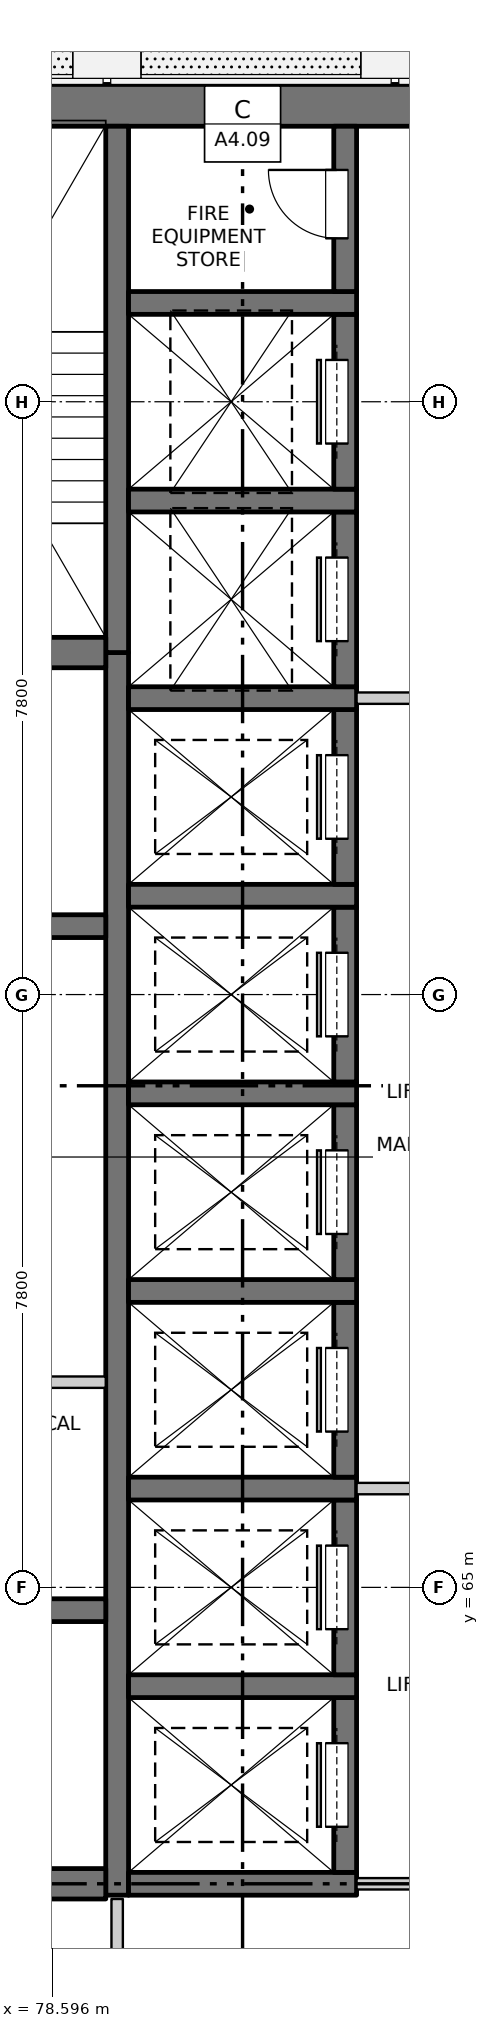
"""IFC4 building model, lengths in metres.
Left out: names, types, materials, properties, quantities, classifications, styles, units other than length and angle.
Written with IfcOpenShell. Run it as: python <this file> out.ifc"""

import sys

from ifc_helpers import new_model, si_unit, direction, frame, frame_2d, origin, place, context, subcontext, project, spatial, rectangle, extrude, element, fill, save


model = new_model("IFC4")
c1 = context("Model", 3, precision=1e-05, world=origin(), true_north=direction((0.0, 1.0)))
c2 = subcontext(c1, "Body", "Model", "MODEL_VIEW")
j1 = project(units=[si_unit("LENGTHUNIT", "METRE"), si_unit("PLANEANGLEUNIT", "RADIAN")], contexts=[c1])
p1 = place(None, origin())
s1 = spatial("IfcSite", under=j1, at=p1, CompositionType="ELEMENT")
p2 = place(p1, origin())
s2 = spatial("IfcBuilding", under=s1, at=p2, CompositionType="ELEMENT")
p3 = place(p2, frame((0.0, 0.0, 113.5)))
s3 = spatial("IfcBuildingStorey", under=s2, at=p3, CompositionType="ELEMENT", Elevation=113.5)
p4 = place(p3, frame((75.525, 84.5, -0.25), z_axis=(0.0, 0.0, 1.0), x_axis=(1.0, 0.0, 0.0)))
e1 = element("IfcWall", 1, at=p4, inside=s3, PredefinedType="SOLIDWALL", context=c2, shape_type="SweptSolid", body=[
    extrude(rectangle(XDim=18.95, YDim=0.55, at=frame_2d((9.475, 0.0))), origin(), (0.0, 0.0, 1.0), 3.35),
])
p5 = place(p3, frame((79.45, 60.95, -0.25), z_axis=(0.0, 0.0, 1.0), x_axis=(0.0, 1.0, 0.0)))
e2 = element("IfcWall", 2, at=p5, inside=s3, PredefinedType="SOLIDWALL", context=c2, shape_type="SweptSolid", body=[
    extrude(rectangle(XDim=16.35, YDim=0.3, at=frame_2d((8.175, 0.0))), origin(), (0.0, 0.0, 1.0), 3.35),
])
p6 = place(p3, frame((79.45, 77.3, -0.25), z_axis=(0.0, 0.0, 1.0), x_axis=(0.0, 1.0, 0.0)))
e3 = element("IfcWall", 3, at=p6, inside=s3, PredefinedType="SOLIDWALL", context=c2, shape_type="SweptSolid", body=[
    extrude(rectangle(XDim=6.925, YDim=0.3, at=frame_2d((3.462, 0.0))), origin(), (0.0, 0.0, 1.0), 3.35),
])
p7 = place(p3, frame((79.6, 61.1, -0.25), z_axis=(0.0, 0.0, 1.0), x_axis=(1.0, 0.0, 0.0)))
e4 = element("IfcWall", 4, at=p7, inside=s3, PredefinedType="SOLIDWALL", context=c2, shape_type="SweptSolid", body=[
    extrude(rectangle(XDim=3.0, YDim=0.3, at=frame_2d((1.5, 0.0))), origin(), (0.0, 0.0, 1.0), 3.35),
])
p8 = place(p3, frame((82.45, 61.25, -0.25), z_axis=(0.0, 0.0, 1.0), x_axis=(0.0, 1.0, 0.0)))
e5 = element("IfcWall", 5, at=p8, inside=s3, PredefinedType="SOLIDWALL", context=c2, shape_type="SweptSolid", body=[
    extrude(rectangle(XDim=2.3, YDim=0.3, at=frame_2d((1.15, 0.0))), origin(), (0.0, 0.0, 1.0), 3.35),
])
p9 = place(p8, frame((0.6, 0.0, 0.25)))
e6 = element("IfcOpeningElement", 6, at=p9, cuts=e5, PredefinedType="OPENING", context=c2, shape_type="SweptSolid", body=[
    extrude(rectangle(XDim=1.1, YDim=2.1, at=frame_2d((0.55, 1.05))), frame((0.0, 0.16, 0.0), z_axis=(0.0, -1.0, 0.0), x_axis=(1.0, 0.0, 0.0)), (0.0, 0.0, 1.0), 0.32),
])
p10 = place(p3, frame((79.6, 63.7, -0.25), z_axis=(0.0, 0.0, 1.0), x_axis=(1.0, 0.0, 0.0)))
e7 = element("IfcWall", 7, at=p10, inside=s3, PredefinedType="SOLIDWALL", context=c2, shape_type="SweptSolid", body=[
    extrude(rectangle(XDim=3.0, YDim=0.3, at=frame_2d((1.5, 0.0))), origin(), (0.0, 0.0, 1.0), 3.35),
])
p11 = place(p3, frame((82.45, 63.85, -0.25), z_axis=(0.0, 0.0, 1.0), x_axis=(0.0, 1.0, 0.0)))
e8 = element("IfcWall", 8, at=p11, inside=s3, PredefinedType="SOLIDWALL", context=c2, shape_type="SweptSolid", body=[
    extrude(rectangle(XDim=2.3, YDim=0.3, at=frame_2d((1.15, 0.0))), origin(), (0.0, 0.0, 1.0), 3.35),
])
p12 = place(p11, frame((0.6, 0.0, 0.25)))
e9 = element("IfcOpeningElement", 9, at=p12, cuts=e8, PredefinedType="OPENING", context=c2, shape_type="SweptSolid", body=[
    extrude(rectangle(XDim=1.1, YDim=2.1, at=frame_2d((0.55, 1.05))), frame((0.0, 0.16, 0.0), z_axis=(0.0, -1.0, 0.0), x_axis=(1.0, 0.0, 0.0)), (0.0, 0.0, 1.0), 0.32),
])
p13 = place(p3, frame((79.6, 66.3, -0.25), z_axis=(0.0, 0.0, 1.0), x_axis=(1.0, 0.0, 0.0)))
e10 = element("IfcWall", 10, at=p13, inside=s3, PredefinedType="SOLIDWALL", context=c2, shape_type="SweptSolid", body=[
    extrude(rectangle(XDim=3.0, YDim=0.3, at=frame_2d((1.5, 0.0))), origin(), (0.0, 0.0, 1.0), 3.35),
])
p14 = place(p3, frame((82.45, 66.45, -0.25), z_axis=(0.0, 0.0, 1.0), x_axis=(0.0, 1.0, 0.0)))
e11 = element("IfcWall", 11, at=p14, inside=s3, PredefinedType="SOLIDWALL", context=c2, shape_type="SweptSolid", body=[
    extrude(rectangle(XDim=2.3, YDim=0.3, at=frame_2d((1.15, 0.0))), origin(), (0.0, 0.0, 1.0), 3.35),
])
p15 = place(p14, frame((0.6, 0.0, 0.25)))
e12 = element("IfcOpeningElement", 12, at=p15, cuts=e11, PredefinedType="OPENING", context=c2, shape_type="SweptSolid", body=[
    extrude(rectangle(XDim=1.1, YDim=2.1, at=frame_2d((0.55, 1.05))), frame((0.0, 0.16, 0.0), z_axis=(0.0, -1.0, 0.0), x_axis=(1.0, 0.0, 0.0)), (0.0, 0.0, 1.0), 0.32),
])
p16 = place(p3, frame((79.6, 68.9, -0.25), z_axis=(0.0, 0.0, 1.0), x_axis=(1.0, 0.0, 0.0)))
e13 = element("IfcWall", 13, at=p16, inside=s3, PredefinedType="SOLIDWALL", context=c2, shape_type="SweptSolid", body=[
    extrude(rectangle(XDim=3.0, YDim=0.3, at=frame_2d((1.5, 0.0))), origin(), (0.0, 0.0, 1.0), 3.35),
])
p17 = place(p3, frame((82.45, 69.05, -0.25), z_axis=(0.0, 0.0, 1.0), x_axis=(0.0, 1.0, 0.0)))
e14 = element("IfcWall", 14, at=p17, inside=s3, PredefinedType="SOLIDWALL", context=c2, shape_type="SweptSolid", body=[
    extrude(rectangle(XDim=2.3, YDim=0.3, at=frame_2d((1.15, 0.0))), origin(), (0.0, 0.0, 1.0), 3.35),
])
p18 = place(p17, frame((0.6, 0.0, 0.25)))
e15 = element("IfcOpeningElement", 15, at=p18, cuts=e14, PredefinedType="OPENING", context=c2, shape_type="SweptSolid", body=[
    extrude(rectangle(XDim=1.1, YDim=2.1, at=frame_2d((0.55, 1.05))), frame((0.0, 0.16, 0.0), z_axis=(0.0, -1.0, 0.0), x_axis=(1.0, 0.0, 0.0)), (0.0, 0.0, 1.0), 0.32),
])
p19 = place(p3, frame((79.6, 71.5, -0.25), z_axis=(0.0, 0.0, 1.0), x_axis=(1.0, 0.0, 0.0)))
e16 = element("IfcWall", 16, at=p19, inside=s3, PredefinedType="SOLIDWALL", context=c2, shape_type="SweptSolid", body=[
    extrude(rectangle(XDim=3.0, YDim=0.3, at=frame_2d((1.5, 0.0))), origin(), (0.0, 0.0, 1.0), 3.35),
])
p20 = place(p3, frame((82.45, 71.65, -0.25), z_axis=(0.0, 0.0, 1.0), x_axis=(0.0, 1.0, 0.0)))
e17 = element("IfcWall", 17, at=p20, inside=s3, PredefinedType="SOLIDWALL", context=c2, shape_type="SweptSolid", body=[
    extrude(rectangle(XDim=2.3, YDim=0.3, at=frame_2d((1.15, 0.0))), origin(), (0.0, 0.0, 1.0), 3.35),
])
p21 = place(p20, frame((0.6, 0.0, 0.25)))
e18 = element("IfcOpeningElement", 18, at=p21, cuts=e17, PredefinedType="OPENING", context=c2, shape_type="SweptSolid", body=[
    extrude(rectangle(XDim=1.1, YDim=2.1, at=frame_2d((0.55, 1.05))), frame((0.0, 0.16, 0.0), z_axis=(0.0, -1.0, 0.0), x_axis=(1.0, 0.0, 0.0)), (0.0, 0.0, 1.0), 0.32),
])
p22 = place(p3, frame((79.6, 74.1, -0.25), z_axis=(0.0, 0.0, 1.0), x_axis=(1.0, 0.0, 0.0)))
e19 = element("IfcWall", 19, at=p22, inside=s3, PredefinedType="SOLIDWALL", context=c2, shape_type="SweptSolid", body=[
    extrude(rectangle(XDim=3.0, YDim=0.3, at=frame_2d((1.5, 0.0))), origin(), (0.0, 0.0, 1.0), 3.35),
])
p23 = place(p3, frame((82.45, 74.25, -0.25), z_axis=(0.0, 0.0, 1.0), x_axis=(0.0, 1.0, 0.0)))
e20 = element("IfcWall", 20, at=p23, inside=s3, PredefinedType="SOLIDWALL", context=c2, shape_type="SweptSolid", body=[
    extrude(rectangle(XDim=2.3, YDim=0.3, at=frame_2d((1.15, 0.0))), origin(), (0.0, 0.0, 1.0), 3.35),
])
p24 = place(p23, frame((0.6, 0.0, 0.25)))
e21 = element("IfcOpeningElement", 21, at=p24, cuts=e20, PredefinedType="OPENING", context=c2, shape_type="SweptSolid", body=[
    extrude(rectangle(XDim=1.1, YDim=2.1, at=frame_2d((0.55, 1.05))), frame((0.0, 0.16, 0.0), z_axis=(0.0, -1.0, 0.0), x_axis=(1.0, 0.0, 0.0)), (0.0, 0.0, 1.0), 0.32),
])
p25 = place(p3, frame((79.6, 76.7, -0.25), z_axis=(0.0, 0.0, 1.0), x_axis=(1.0, 0.0, 0.0)))
e22 = element("IfcWall", 22, at=p25, inside=s3, PredefinedType="SOLIDWALL", context=c2, shape_type="SweptSolid", body=[
    extrude(rectangle(XDim=3.0, YDim=0.3, at=frame_2d((1.5, 0.0))), origin(), (0.0, 0.0, 1.0), 3.35),
])
p26 = place(p3, frame((82.45, 76.85, -0.25), z_axis=(0.0, 0.0, 1.0), x_axis=(0.0, 1.0, 0.0)))
e23 = element("IfcWall", 23, at=p26, inside=s3, PredefinedType="SOLIDWALL", context=c2, shape_type="SweptSolid", body=[
    extrude(rectangle(XDim=2.3, YDim=0.3, at=frame_2d((1.15, 0.0))), origin(), (0.0, 0.0, 1.0), 3.35),
])
p27 = place(p26, frame((0.6, 0.0, 0.25)))
e24 = element("IfcOpeningElement", 24, at=p27, cuts=e23, PredefinedType="OPENING", context=c2, shape_type="SweptSolid", body=[
    extrude(rectangle(XDim=1.1, YDim=2.1, at=frame_2d((0.55, 1.05))), frame((0.0, 0.16, 0.0), z_axis=(0.0, -1.0, 0.0), x_axis=(1.0, 0.0, 0.0)), (0.0, 0.0, 1.0), 0.32),
])
p28 = place(p3, frame((79.6, 79.3, -0.25), z_axis=(0.0, 0.0, 1.0), x_axis=(1.0, 0.0, 0.0)))
e25 = element("IfcWall", 25, at=p28, inside=s3, PredefinedType="SOLIDWALL", context=c2, shape_type="SweptSolid", body=[
    extrude(rectangle(XDim=3.0, YDim=0.3, at=frame_2d((1.5, 0.0))), origin(), (0.0, 0.0, 1.0), 3.35),
])
p29 = place(p3, frame((82.45, 79.45, -0.25), z_axis=(0.0, 0.0, 1.0), x_axis=(0.0, 1.0, 0.0)))
e26 = element("IfcWall", 26, at=p29, inside=s3, PredefinedType="SOLIDWALL", context=c2, shape_type="SweptSolid", body=[
    extrude(rectangle(XDim=2.3, YDim=0.3, at=frame_2d((1.15, 0.0))), origin(), (0.0, 0.0, 1.0), 3.35),
])
p30 = place(p29, frame((0.6, 0.0, 0.25)))
e27 = element("IfcOpeningElement", 27, at=p30, cuts=e26, PredefinedType="OPENING", context=c2, shape_type="SweptSolid", body=[
    extrude(rectangle(XDim=1.1, YDim=2.1, at=frame_2d((0.55, 1.05))), frame((0.0, 0.16, 0.0), z_axis=(0.0, -1.0, 0.0), x_axis=(1.0, 0.0, 0.0)), (0.0, 0.0, 1.0), 0.32),
])
p31 = place(p3, frame((79.6, 81.9, -0.25), z_axis=(0.0, 0.0, 1.0), x_axis=(1.0, 0.0, 0.0)))
e28 = element("IfcWall", 28, at=p31, inside=s3, PredefinedType="SOLIDWALL", context=c2, shape_type="SweptSolid", body=[
    extrude(rectangle(XDim=3.0, YDim=0.3, at=frame_2d((1.5, 0.0))), origin(), (0.0, 0.0, 1.0), 3.35),
])
p32 = place(p3, frame((82.45, 82.05, -0.25), z_axis=(0.0, 0.0, 1.0), x_axis=(0.0, 1.0, 0.0)))
e29 = element("IfcWall", 29, at=p32, inside=s3, PredefinedType="SOLIDWALL", context=c2, shape_type="SweptSolid", body=[
    extrude(rectangle(XDim=2.175, YDim=0.3, at=frame_2d((1.087, 0.0))), origin(), (0.0, 0.0, 1.0), 3.35),
])
p33 = place(p32, frame((0.7, 0.0, 0.25)))
e30 = element("IfcOpeningElement", 30, at=p33, cuts=e29, PredefinedType="OPENING", context=c2, shape_type="SweptSolid", body=[
    extrude(rectangle(XDim=0.9, YDim=2.1, at=frame_2d((0.45, 1.05))), frame((0.0, 0.16, 0.0), z_axis=(0.0, -1.0, 0.0), x_axis=(1.0, 0.0, 0.0)), (0.0, 0.0, 1.0), 0.32),
])
p34 = place(p3, frame((75.525, 61.1, -0.25), z_axis=(0.0, 0.0, 1.0), x_axis=(1.0, 0.0, 0.0)))
e31 = element("IfcWall", 31, at=p34, inside=s3, PredefinedType="SOLIDWALL", context=c2, shape_type="SweptSolid", body=[
    extrude(rectangle(XDim=3.775, YDim=0.4, at=frame_2d((1.888, 0.0))), origin(), (0.0, 0.0, 1.0), 3.35),
])
for number, where, z_axis, x_axis in (
    (32, (75.525, 64.7, -0.25), (0.0, 0.0, 1.0), (1.0, 0.0, 0.0)),
    (33, (75.525, 73.7, -0.25), (0.0, 0.0, 1.0), (1.0, 0.0, 0.0)),
):
    element("IfcWall", number, at=place(p3, frame(where, z_axis=z_axis, x_axis=x_axis)), inside=s3, PredefinedType="SOLIDWALL", context=c2, shape_type="SweptSolid", body=[
        extrude(rectangle(XDim=3.775, YDim=0.3, at=frame_2d((1.888, 0.0))), origin(), (0.0, 0.0, 1.0), 3.35),
    ])
p35 = place(p3, frame((75.525, 77.3, -0.25), z_axis=(0.0, 0.0, 1.0), x_axis=(1.0, 0.0, 0.0)))
e34 = element("IfcWall", 34, at=p35, inside=s3, PredefinedType="SOLIDWALL", context=c2, shape_type="SweptSolid", body=[
    extrude(rectangle(XDim=3.775, YDim=0.4, at=frame_2d((1.888, 0.0))), origin(), (0.0, 0.0, 1.0), 3.35),
])
p36 = place(p3, frame((82.6, 61.1, 0.0), z_axis=(0.0, 0.0, 1.0), x_axis=(1.0, 0.0, 0.0)))
e35 = element("IfcWall", 35, at=p36, inside=s3, PredefinedType="PARTITIONING", context=c2, shape_type="SweptSolid", body=[
    extrude(rectangle(XDim=4.8, YDim=0.15, at=frame_2d((2.4, 0.0))), origin(), (0.0, 0.0, 1.0), 3.1),
])
p37 = place(p36, frame((1.5, 0.0, 0.0)))
e36 = element("IfcOpeningElement", 36, at=p37, cuts=e35, PredefinedType="OPENING", context=c2, shape_type="SweptSolid", body=[
    extrude(rectangle(XDim=1.8, YDim=2.1, at=frame_2d((0.9, 1.05))), frame((0.0, 0.085, 0.0), z_axis=(0.0, -1.0, 0.0), x_axis=(1.0, 0.0, 0.0)), (0.0, 0.0, 1.0), 0.17),
])
p38 = place(p3, frame((82.6, 66.3, 0.0), z_axis=(0.0, 0.0, 1.0), x_axis=(1.0, 0.0, 0.0)))
e37 = element("IfcWall", 37, at=p38, inside=s3, PredefinedType="PARTITIONING", context=c2, shape_type="SweptSolid", body=[
    extrude(rectangle(XDim=4.8, YDim=0.15, at=frame_2d((2.4, 0.0))), origin(), (0.0, 0.0, 1.0), 3.1),
])
p39 = place(p38, frame((1.5, 0.0, 0.0)))
e38 = element("IfcOpeningElement", 38, at=p39, cuts=e37, PredefinedType="OPENING", context=c2, shape_type="SweptSolid", body=[
    extrude(rectangle(XDim=1.8, YDim=2.1, at=frame_2d((0.9, 1.05))), frame((0.0, 0.085, 0.0), z_axis=(0.0, -1.0, 0.0), x_axis=(1.0, 0.0, 0.0)), (0.0, 0.0, 1.0), 0.17),
])
p40 = place(p3, frame((75.525, 67.7, 0.0), z_axis=(0.0, 0.0, 1.0), x_axis=(1.0, 0.0, 0.0)))
e39 = element("IfcWall", 39, at=p40, inside=s3, PredefinedType="PARTITIONING", context=c2, shape_type="SweptSolid", body=[
    extrude(rectangle(XDim=3.775, YDim=0.15, at=frame_2d((1.887, 0.0))), origin(), (0.0, 0.0, 1.0), 3.1),
])
p41 = place(p3, frame((82.6, 76.7, 0.0), z_axis=(0.0, 0.0, 1.0), x_axis=(1.0, 0.0, 0.0)))
e40 = element("IfcWall", 40, at=p41, inside=s3, PredefinedType="PARTITIONING", context=c2, shape_type="SweptSolid", body=[
    extrude(rectangle(XDim=4.8, YDim=0.15, at=frame_2d((2.4, 0.0))), origin(), (0.0, 0.0, 1.0), 3.1),
])
p42 = place(p41, frame((1.5, 0.0, 0.0)))
e41 = element("IfcOpeningElement", 41, at=p42, cuts=e40, PredefinedType="OPENING", context=c2, shape_type="SweptSolid", body=[
    extrude(rectangle(XDim=1.8, YDim=2.1, at=frame_2d((0.9, 1.05))), frame((0.0, 0.085, 0.0), z_axis=(0.0, -1.0, 0.0), x_axis=(1.0, 0.0, 0.0)), (0.0, 0.0, 1.0), 0.17),
])
p43 = place(p3, frame((79.45, 55.525, 0.0), z_axis=(0.0, 0.0, 1.0), x_axis=(0.0, 1.0, 0.0)))
e42 = element("IfcWall", 42, at=p43, inside=s3, PredefinedType="PARTITIONING", context=c2, shape_type="SweptSolid", body=[
    extrude(rectangle(XDim=5.375, YDim=0.15, at=frame_2d((2.688, 0.0))), origin(), (0.0, 0.0, 1.0), 3.1),
])
p44 = place(p43, frame((2.175, 0.0, 0.0)))
e43 = element("IfcOpeningElement", 43, at=p44, cuts=e42, PredefinedType="OPENING", context=c2, shape_type="SweptSolid", body=[
    extrude(rectangle(XDim=0.9, YDim=2.1, at=frame_2d((0.45, 1.05))), frame((0.0, 0.085, 0.0), z_axis=(0.0, -1.0, 0.0), x_axis=(1.0, 0.0, 0.0)), (0.0, 0.0, 1.0), 0.17),
])
p45 = place(p9, origin())
e44 = element("IfcDoor", 44, at=p45, inside=s3, OperationType="SLIDING_TO_RIGHT", PredefinedType="DOOR", context=c2, shape_type="SweptSolid", body=[
    extrude(rectangle(XDim=1.1, YDim=2.1, at=frame_2d((0.55, 1.05))), frame((0.0, 0.135, 0.0), z_axis=(0.0, -1.0, 0.0), x_axis=(1.0, 0.0, 0.0)), (0.0, 0.0, 1.0), 0.05),
])
fill(e6, e44)
p46 = place(p12, origin())
e45 = element("IfcDoor", 45, at=p46, inside=s3, OperationType="SLIDING_TO_RIGHT", PredefinedType="DOOR", context=c2, shape_type="SweptSolid", body=[
    extrude(rectangle(XDim=1.1, YDim=2.1, at=frame_2d((0.55, 1.05))), frame((0.0, 0.135, 0.0), z_axis=(0.0, -1.0, 0.0), x_axis=(1.0, 0.0, 0.0)), (0.0, 0.0, 1.0), 0.05),
])
fill(e9, e45)
p47 = place(p15, origin())
e46 = element("IfcDoor", 46, at=p47, inside=s3, OperationType="SLIDING_TO_RIGHT", PredefinedType="DOOR", context=c2, shape_type="SweptSolid", body=[
    extrude(rectangle(XDim=1.1, YDim=2.1, at=frame_2d((0.55, 1.05))), frame((0.0, 0.135, 0.0), z_axis=(0.0, -1.0, 0.0), x_axis=(1.0, 0.0, 0.0)), (0.0, 0.0, 1.0), 0.05),
])
fill(e12, e46)
p48 = place(p18, origin())
e47 = element("IfcDoor", 47, at=p48, inside=s3, OperationType="SLIDING_TO_LEFT", PredefinedType="DOOR", context=c2, shape_type="SweptSolid", body=[
    extrude(rectangle(XDim=1.1, YDim=2.1, at=frame_2d((0.55, 1.05))), frame((0.0, 0.135, 0.0), z_axis=(0.0, -1.0, 0.0), x_axis=(1.0, 0.0, 0.0)), (0.0, 0.0, 1.0), 0.05),
])
fill(e15, e47)
p49 = place(p21, origin())
e48 = element("IfcDoor", 48, at=p49, inside=s3, OperationType="SLIDING_TO_LEFT", PredefinedType="DOOR", context=c2, shape_type="SweptSolid", body=[
    extrude(rectangle(XDim=1.1, YDim=2.1, at=frame_2d((0.55, 1.05))), frame((0.0, 0.135, 0.0), z_axis=(0.0, -1.0, 0.0), x_axis=(1.0, 0.0, 0.0)), (0.0, 0.0, 1.0), 0.05),
])
fill(e18, e48)
p50 = place(p24, origin())
e49 = element("IfcDoor", 49, at=p50, inside=s3, OperationType="SLIDING_TO_LEFT", PredefinedType="DOOR", context=c2, shape_type="SweptSolid", body=[
    extrude(rectangle(XDim=1.1, YDim=2.1, at=frame_2d((0.55, 1.05))), frame((0.0, 0.135, 0.0), z_axis=(0.0, -1.0, 0.0), x_axis=(1.0, 0.0, 0.0)), (0.0, 0.0, 1.0), 0.05),
])
fill(e21, e49)
p51 = place(p27, origin())
e50 = element("IfcDoor", 50, at=p51, inside=s3, OperationType="SLIDING_TO_LEFT", PredefinedType="DOOR", context=c2, shape_type="SweptSolid", body=[
    extrude(rectangle(XDim=1.1, YDim=2.1, at=frame_2d((0.55, 1.05))), frame((0.0, 0.135, 0.0), z_axis=(0.0, -1.0, 0.0), x_axis=(1.0, 0.0, 0.0)), (0.0, 0.0, 1.0), 0.05),
])
fill(e24, e50)
p52 = place(p30, origin())
e51 = element("IfcDoor", 51, at=p52, inside=s3, OperationType="SLIDING_TO_LEFT", PredefinedType="DOOR", context=c2, shape_type="SweptSolid", body=[
    extrude(rectangle(XDim=1.1, YDim=2.1, at=frame_2d((0.55, 1.05))), frame((0.0, 0.135, 0.0), z_axis=(0.0, -1.0, 0.0), x_axis=(1.0, 0.0, 0.0)), (0.0, 0.0, 1.0), 0.05),
])
fill(e27, e51)
p53 = place(p33, origin())
e52 = element("IfcDoor", 52, at=p53, inside=s3, OperationType="SINGLE_SWING_RIGHT", PredefinedType="DOOR", context=c2, shape_type="SweptSolid", body=[
    extrude(rectangle(XDim=0.9, YDim=2.1, at=frame_2d((0.45, 1.05))), frame((0.0, 0.135, 0.0), z_axis=(0.0, -1.0, 0.0), x_axis=(1.0, 0.0, 0.0)), (0.0, 0.0, 1.0), 0.05),
])
fill(e30, e52)
save(model, sys.argv[1])
